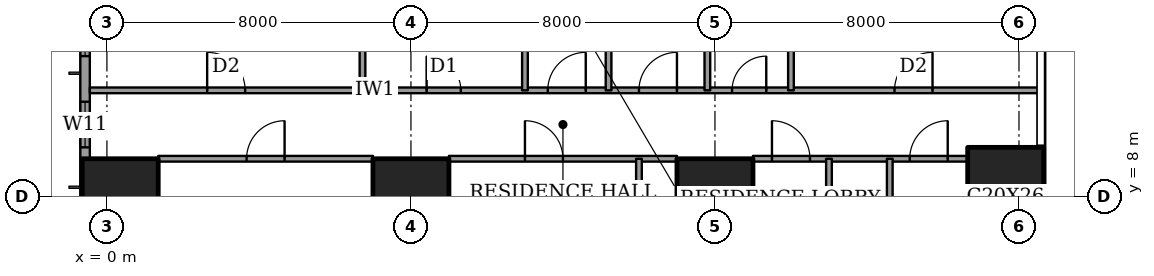
"""IFC4 building model, lengths in metres.
Left out: names, types, materials, properties, quantities, classifications, styles, units other than length and angle.
Written with IfcOpenShell. Run it as: python <this file> out.ifc"""

import sys

from ifc_helpers import new_model, si_unit, direction, frame, frame_2d, origin, origin_2d, place, context, subcontext, project, spatial, rectangle, extrude, element, fill, save


model = new_model("IFC4")
c1 = context("Model", 3, precision=1e-05, world=origin(), true_north=direction((0.0, 1.0)))
c2 = subcontext(c1, "Body", "Model", "MODEL_VIEW")
j1 = project(units=[si_unit("LENGTHUNIT", "METRE"), si_unit("PLANEANGLEUNIT", "RADIAN")], contexts=[c1])
p1 = place(None, origin())
s1 = spatial("IfcSite", under=j1, at=p1, CompositionType="ELEMENT")
p2 = place(p1, origin())
s2 = spatial("IfcBuilding", under=s1, at=p2, CompositionType="ELEMENT")
p3 = place(p2, frame((0.0, 0.0, 99.8)))
s3 = spatial("IfcBuildingStorey", under=s2, at=p3, CompositionType="ELEMENT", Elevation=99.8)
for number, where, z_axis, x_axis in (
    (1, (0.35, 8.0, 0.0), (0.0, 0.0, 1.0), (1.0, 0.0, 0.0)),
    (2, (8.0, 8.0, 0.0), (0.0, 0.0, 1.0), (1.0, 0.0, 0.0)),
    (3, (16.0, 8.0, 0.0), (0.0, 0.0, 1.0), (1.0, 0.0, 0.0)),
):
    element("IfcColumn", number, at=place(p3, frame(where, z_axis=z_axis, x_axis=x_axis)), inside=s3, PredefinedType="COLUMN", context=c2, shape_type="SweptSolid", body=[
        extrude(rectangle(XDim=2.0, YDim=2.0, at=origin_2d()), origin(), (0.0, 0.0, 1.0), 3.6),
    ])
p4 = place(p3, frame((23.65, 8.0, 0.0), z_axis=(0.0, 0.0, 1.0), x_axis=(1.0, 0.0, 0.0)))
e4 = element("IfcColumn", 4, at=p4, inside=s3, PredefinedType="COLUMN", context=c2, shape_type="SweptSolid", body=[
    extrude(rectangle(XDim=2.0, YDim=2.6, at=origin_2d()), origin(), (0.0, 0.0, 1.0), 3.6),
])
p5 = place(p3, frame((-0.575, 44.825, 0.0), z_axis=(0.0, 0.0, 1.0), x_axis=(0.0, -1.0, 0.0)))
e5 = element("IfcWall", 5, at=p5, inside=s3, PredefinedType="SOLIDWALL", context=c2, shape_type="SweptSolid", body=[
    extrude(rectangle(XDim=41.65, YDim=0.25, at=frame_2d((20.825, 0.0))), origin(), (0.0, 0.0, 1.0), 3.6),
])
p6 = place(p5, frame((0.775, 0.0, 0.4)))
e6 = element("IfcOpeningElement", 6, at=p6, cuts=e5, PredefinedType="OPENING", context=c2, shape_type="SweptSolid", body=[
    extrude(rectangle(XDim=2.4, YDim=2.2, at=frame_2d((1.2, 1.1))), frame((0.0, 0.135, 0.0), z_axis=(0.0, -1.0, 0.0), x_axis=(1.0, 0.0, 0.0)), (0.0, 0.0, 1.0), 0.27),
])
p7 = place(p5, frame((6.1, 0.0, 0.4)))
e7 = element("IfcOpeningElement", 7, at=p7, cuts=e5, PredefinedType="OPENING", context=c2, shape_type="SweptSolid", body=[
    extrude(rectangle(XDim=1.2, YDim=2.2, at=frame_2d((0.6, 1.1))), frame((0.0, 0.135, 0.0), z_axis=(0.0, -1.0, 0.0), x_axis=(1.0, 0.0, 0.0)), (0.0, 0.0, 1.0), 0.27),
])
p8 = place(p5, frame((8.425, 0.0, 0.4)))
e8 = element("IfcOpeningElement", 8, at=p8, cuts=e5, PredefinedType="OPENING", context=c2, shape_type="SweptSolid", body=[
    extrude(rectangle(XDim=2.4, YDim=2.2, at=frame_2d((1.2, 1.1))), frame((0.0, 0.135, 0.0), z_axis=(0.0, -1.0, 0.0), x_axis=(1.0, 0.0, 0.0)), (0.0, 0.0, 1.0), 0.27),
])
p9 = place(p5, frame((15.625, 0.0, 0.4)))
e9 = element("IfcOpeningElement", 9, at=p9, cuts=e5, PredefinedType="OPENING", context=c2, shape_type="SweptSolid", body=[
    extrude(rectangle(XDim=2.4, YDim=2.2, at=frame_2d((1.2, 1.1))), frame((0.0, 0.135, 0.0), z_axis=(0.0, -1.0, 0.0), x_axis=(1.0, 0.0, 0.0)), (0.0, 0.0, 1.0), 0.27),
])
p10 = place(p5, frame((23.625, 0.0, 0.4)))
e10 = element("IfcOpeningElement", 10, at=p10, cuts=e5, PredefinedType="OPENING", context=c2, shape_type="SweptSolid", body=[
    extrude(rectangle(XDim=2.4, YDim=2.2, at=frame_2d((1.2, 1.1))), frame((0.0, 0.135, 0.0), z_axis=(0.0, -1.0, 0.0), x_axis=(1.0, 0.0, 0.0)), (0.0, 0.0, 1.0), 0.27),
])
p11 = place(p5, frame((30.725, 0.0, 0.4)))
e11 = element("IfcOpeningElement", 11, at=p11, cuts=e5, PredefinedType="OPENING", context=c2, shape_type="SweptSolid", body=[
    extrude(rectangle(XDim=2.4, YDim=2.2, at=frame_2d((1.2, 1.1))), frame((0.0, 0.135, 0.0), z_axis=(0.0, -1.0, 0.0), x_axis=(1.0, 0.0, 0.0)), (0.0, 0.0, 1.0), 0.27),
])
p12 = place(p5, frame((34.325, 0.0, 0.4)))
e12 = element("IfcOpeningElement", 12, at=p12, cuts=e5, PredefinedType="OPENING", context=c2, shape_type="SweptSolid", body=[
    extrude(rectangle(XDim=1.2, YDim=2.2, at=frame_2d((0.6, 1.1))), frame((0.0, 0.135, 0.0), z_axis=(0.0, -1.0, 0.0), x_axis=(1.0, 0.0, 0.0)), (0.0, 0.0, 1.0), 0.27),
])
p13 = place(p5, frame((38.475, 0.0, 0.4)))
e13 = element("IfcOpeningElement", 13, at=p13, cuts=e5, PredefinedType="OPENING", context=c2, shape_type="SweptSolid", body=[
    extrude(rectangle(XDim=2.4, YDim=2.2, at=frame_2d((1.2, 1.1))), frame((0.0, 0.135, 0.0), z_axis=(0.0, -1.0, 0.0), x_axis=(1.0, 0.0, 0.0)), (0.0, 0.0, 1.0), 0.27),
])
p14 = place(p3, frame((1.35, 9.0, 0.0), z_axis=(0.0, 0.0, 1.0), x_axis=(1.0, 0.0, 0.0)))
e14 = element("IfcWall", 14, at=p14, inside=s3, PredefinedType="PARTITIONING", context=c2, shape_type="SweptSolid", body=[
    extrude(rectangle(XDim=5.65, YDim=0.15, at=frame_2d((2.825, 0.0))), origin(), (0.0, 0.0, 1.0), 3.35),
])
p15 = place(p14, frame((2.325, 0.0, 0.0)))
e15 = element("IfcOpeningElement", 15, at=p15, cuts=e14, PredefinedType="OPENING", context=c2, shape_type="SweptSolid", body=[
    extrude(rectangle(XDim=1.0, YDim=2.1, at=frame_2d((0.5, 1.05))), frame((0.0, 0.085, 0.0), z_axis=(0.0, -1.0, 0.0), x_axis=(1.0, 0.0, 0.0)), (0.0, 0.0, 1.0), 0.17),
])
p16 = place(p3, frame((9.0, 9.0, 0.0), z_axis=(0.0, 0.0, 1.0), x_axis=(1.0, 0.0, 0.0)))
e16 = element("IfcWall", 16, at=p16, inside=s3, PredefinedType="PARTITIONING", context=c2, shape_type="SweptSolid", body=[
    extrude(rectangle(XDim=6.0, YDim=0.15, at=frame_2d((3.0, 0.0))), origin(), (0.0, 0.0, 1.0), 3.35),
])
p17 = place(p16, frame((2.0, 0.0, 0.0)))
e17 = element("IfcOpeningElement", 17, at=p17, cuts=e16, PredefinedType="OPENING", context=c2, shape_type="SweptSolid", body=[
    extrude(rectangle(XDim=1.0, YDim=2.1, at=frame_2d((0.5, 1.05))), frame((0.0, 0.085, 0.0), z_axis=(0.0, -1.0, 0.0), x_axis=(1.0, 0.0, 0.0)), (0.0, 0.0, 1.0), 0.17),
])
p18 = place(p3, frame((17.0, 9.0, 0.0), z_axis=(0.0, 0.0, 1.0), x_axis=(1.0, 0.0, 0.0)))
e18 = element("IfcWall", 18, at=p18, inside=s3, PredefinedType="PARTITIONING", context=c2, shape_type="SweptSolid", body=[
    extrude(rectangle(XDim=5.65, YDim=0.15, at=frame_2d((2.825, 0.0))), origin(), (0.0, 0.0, 1.0), 3.35),
])
p19 = place(p18, frame((0.5, 0.0, 0.0)))
e19 = element("IfcOpeningElement", 19, at=p19, cuts=e18, PredefinedType="OPENING", context=c2, shape_type="SweptSolid", body=[
    extrude(rectangle(XDim=1.0, YDim=2.1, at=frame_2d((0.5, 1.05))), frame((0.0, 0.085, 0.0), z_axis=(0.0, -1.0, 0.0), x_axis=(1.0, 0.0, 0.0)), (0.0, 0.0, 1.0), 0.17),
])
p20 = place(p18, frame((4.125, 0.0, 0.0)))
e20 = element("IfcOpeningElement", 20, at=p20, cuts=e18, PredefinedType="OPENING", context=c2, shape_type="SweptSolid", body=[
    extrude(rectangle(XDim=1.0, YDim=2.1, at=frame_2d((0.5, 1.05))), frame((0.0, 0.085, 0.0), z_axis=(0.0, -1.0, 0.0), x_axis=(1.0, 0.0, 0.0)), (0.0, 0.0, 1.0), 0.17),
])
p21 = place(p3, frame((-0.45, 10.8, 0.0), z_axis=(0.0, 0.0, 1.0), x_axis=(1.0, 0.0, 0.0)))
e21 = element("IfcWall", 21, at=p21, inside=s3, PredefinedType="PARTITIONING", context=c2, shape_type="SweptSolid", body=[
    extrude(rectangle(XDim=25.011, YDim=0.15, at=frame_2d((12.505, 0.0))), origin(), (0.0, 0.0, 1.0), 3.35),
])
p22 = place(p21, frame((12.05, 0.0, 0.0)))
e22 = element("IfcOpeningElement", 22, at=p22, cuts=e21, PredefinedType="OPENING", context=c2, shape_type="SweptSolid", body=[
    extrude(rectangle(XDim=1.0, YDim=2.1, at=frame_2d((0.5, 1.05))), frame((0.0, 0.085, 0.0), z_axis=(0.0, -1.0, 0.0), x_axis=(1.0, 0.0, 0.0)), (0.0, 0.0, 1.0), 0.17),
])
p23 = place(p21, frame((3.087, 0.0, 0.0)))
e23 = element("IfcOpeningElement", 23, at=p23, cuts=e21, PredefinedType="OPENING", context=c2, shape_type="SweptSolid", body=[
    extrude(rectangle(XDim=1.0, YDim=2.1, at=frame_2d((0.5, 1.05))), frame((0.0, 0.085, 0.0), z_axis=(0.0, -1.0, 0.0), x_axis=(1.0, 0.0, 0.0)), (0.0, 0.0, 1.0), 0.17),
])
p24 = place(p21, frame((8.863, 0.0, 0.0)))
e24 = element("IfcOpeningElement", 24, at=p24, cuts=e21, PredefinedType="OPENING", context=c2, shape_type="SweptSolid", body=[
    extrude(rectangle(XDim=0.9, YDim=2.1, at=frame_2d((0.45, 1.05))), frame((0.0, 0.085, 0.0), z_axis=(0.0, -1.0, 0.0), x_axis=(1.0, 0.0, 0.0)), (0.0, 0.0, 1.0), 0.17),
])
p25 = place(p21, frame((14.45, 0.0, 0.0)))
e25 = element("IfcOpeningElement", 25, at=p25, cuts=e21, PredefinedType="OPENING", context=c2, shape_type="SweptSolid", body=[
    extrude(rectangle(XDim=1.0, YDim=2.1, at=frame_2d((0.5, 1.05))), frame((0.0, 0.085, 0.0), z_axis=(0.0, -1.0, 0.0), x_axis=(1.0, 0.0, 0.0)), (0.0, 0.0, 1.0), 0.17),
])
p26 = place(p21, frame((16.9, 0.0, 0.0)))
e26 = element("IfcOpeningElement", 26, at=p26, cuts=e21, PredefinedType="OPENING", context=c2, shape_type="SweptSolid", body=[
    extrude(rectangle(XDim=0.9, YDim=2.1, at=frame_2d((0.45, 1.05))), frame((0.0, 0.085, 0.0), z_axis=(0.0, -1.0, 0.0), x_axis=(1.0, 0.0, 0.0)), (0.0, 0.0, 1.0), 0.17),
])
p27 = place(p21, frame((21.175, 0.0, 0.0)))
e27 = element("IfcOpeningElement", 27, at=p27, cuts=e21, PredefinedType="OPENING", context=c2, shape_type="SweptSolid", body=[
    extrude(rectangle(XDim=1.0, YDim=2.1, at=frame_2d((0.5, 1.05))), frame((0.0, 0.085, 0.0), z_axis=(0.0, -1.0, 0.0), x_axis=(1.0, 0.0, 0.0)), (0.0, 0.0, 1.0), 0.17),
])
p28 = place(p3, frame((6.725, 10.8, 0.0), z_axis=(0.0, 0.0, 1.0), x_axis=(0.0, 1.0, 0.0)))
e28 = element("IfcWall", 28, at=p28, inside=s3, PredefinedType="PARTITIONING", context=c2, shape_type="SweptSolid", body=[
    extrude(rectangle(XDim=4.0, YDim=0.15, at=frame_2d((2.0, 0.0))), origin(), (0.0, 0.0, 1.0), 3.35),
])
p29 = place(p3, frame((11.0, 10.8, 0.0), z_axis=(0.0, 0.0, 1.0), x_axis=(0.0, 1.0, 0.0)))
e29 = element("IfcWall", 29, at=p29, inside=s3, PredefinedType="PARTITIONING", context=c2, shape_type="SweptSolid", body=[
    extrude(rectangle(XDim=10.8, YDim=0.15, at=frame_2d((5.4, 0.0))), origin(), (0.0, 0.0, 1.0), 3.35),
])
p30 = place(p29, frame((8.0, 0.0, 0.0)))
e30 = element("IfcOpeningElement", 30, at=p30, cuts=e29, PredefinedType="OPENING", context=c2, shape_type="SweptSolid", body=[
    extrude(rectangle(XDim=1.0, YDim=2.1, at=frame_2d((0.5, 1.05))), frame((0.0, 0.085, 0.0), z_axis=(0.0, -1.0, 0.0), x_axis=(1.0, 0.0, 0.0)), (0.0, 0.0, 1.0), 0.17),
])
p31 = place(p3, frame((13.2, 10.8, 0.0), z_axis=(0.0, 0.0, 1.0), x_axis=(0.0, 1.0, 0.0)))
e31 = element("IfcWall", 31, at=p31, inside=s3, PredefinedType="PARTITIONING", context=c2, shape_type="SweptSolid", body=[
    extrude(rectangle(XDim=6.2, YDim=0.15, at=frame_2d((3.1, 0.0))), origin(), (0.0, 0.0, 1.0), 3.35),
])
p32 = place(p3, frame((14.0, -0.45, 0.0), z_axis=(0.0, 0.0, 1.0), x_axis=(0.0, 1.0, 0.0)))
e32 = element("IfcWall", 32, at=p32, inside=s3, PredefinedType="PARTITIONING", context=c2, shape_type="SweptSolid", body=[
    extrude(rectangle(XDim=9.45, YDim=0.15, at=frame_2d((4.725, 0.0))), origin(), (0.0, 0.0, 1.0), 3.35),
])
p33 = place(p3, frame((15.8, 10.8, 0.0), z_axis=(0.0, 0.0, 1.0), x_axis=(0.0, 1.0, 0.0)))
e33 = element("IfcWall", 33, at=p33, inside=s3, PredefinedType="PARTITIONING", context=c2, shape_type="SweptSolid", body=[
    extrude(rectangle(XDim=4.0, YDim=0.15, at=frame_2d((2.0, 0.0))), origin(), (0.0, 0.0, 1.0), 3.35),
])
p34 = place(p3, frame((18.0, 10.8, 0.0), z_axis=(0.0, 0.0, 1.0), x_axis=(0.0, 1.0, 0.0)))
e34 = element("IfcWall", 34, at=p34, inside=s3, PredefinedType="PARTITIONING", context=c2, shape_type="SweptSolid", body=[
    extrude(rectangle(XDim=6.2, YDim=0.15, at=frame_2d((3.1, 0.0))), origin(), (0.0, 0.0, 1.0), 3.35),
])
p35 = place(p3, frame((19.0, -0.45, 0.0), z_axis=(0.0, 0.0, 1.0), x_axis=(0.0, 1.0, 0.0)))
e35 = element("IfcWall", 35, at=p35, inside=s3, PredefinedType="PARTITIONING", context=c2, shape_type="SweptSolid", body=[
    extrude(rectangle(XDim=9.45, YDim=0.15, at=frame_2d((4.725, 0.0))), origin(), (0.0, 0.0, 1.0), 3.35),
])
p36 = place(p3, frame((20.6, -0.45, 0.0), z_axis=(0.0, 0.0, 1.0), x_axis=(0.0, 1.0, 0.0)))
e36 = element("IfcWall", 36, at=p36, inside=s3, PredefinedType="PARTITIONING", context=c2, shape_type="SweptSolid", body=[
    extrude(rectangle(XDim=9.45, YDim=0.15, at=frame_2d((4.725, 0.0))), origin(), (0.0, 0.0, 1.0), 3.35),
])
p37 = place(p36, frame((4.275, 0.0, 0.0)))
e37 = element("IfcOpeningElement", 37, at=p37, cuts=e36, PredefinedType="OPENING", context=c2, shape_type="SweptSolid", body=[
    extrude(rectangle(XDim=0.9, YDim=2.1, at=frame_2d((0.45, 1.05))), frame((0.0, 0.085, 0.0), z_axis=(0.0, -1.0, 0.0), x_axis=(1.0, 0.0, 0.0)), (0.0, 0.0, 1.0), 0.17),
])
p38 = place(p11, origin())
e38 = element("IfcWindow", 38, at=p38, inside=s3, PartitioningType="SINGLE_PANEL", PredefinedType="WINDOW", context=c2, shape_type="SweptSolid", body=[
    extrude(rectangle(XDim=2.4, YDim=2.2, at=frame_2d((1.2, 1.1))), frame((0.0, 0.03, 0.0), z_axis=(0.0, -1.0, 0.0), x_axis=(1.0, 0.0, 0.0)), (0.0, 0.0, 1.0), 0.06),
])
fill(e11, e38)
p39 = place(p12, origin())
e39 = element("IfcWindow", 39, at=p39, inside=s3, PartitioningType="SINGLE_PANEL", PredefinedType="WINDOW", context=c2, shape_type="SweptSolid", body=[
    extrude(rectangle(XDim=1.2, YDim=2.2, at=frame_2d((0.6, 1.1))), frame((0.0, 0.03, 0.0), z_axis=(0.0, -1.0, 0.0), x_axis=(1.0, 0.0, 0.0)), (0.0, 0.0, 1.0), 0.06),
])
fill(e12, e39)
p40 = place(p15, origin())
e40 = element("IfcDoor", 40, at=p40, inside=s3, OperationType="SINGLE_SWING_LEFT", PredefinedType="DOOR", context=c2, shape_type="SweptSolid", body=[
    extrude(rectangle(XDim=1.0, YDim=2.1, at=frame_2d((0.5, 1.05))), frame((0.0, 0.025, 0.0), z_axis=(0.0, -1.0, 0.0), x_axis=(1.0, 0.0, 0.0)), (0.0, 0.0, 1.0), 0.05),
])
fill(e15, e40)
p41 = place(p17, origin())
e41 = element("IfcDoor", 41, at=p41, inside=s3, OperationType="SINGLE_SWING_RIGHT", PredefinedType="DOOR", context=c2, shape_type="SweptSolid", body=[
    extrude(rectangle(XDim=1.0, YDim=2.1, at=frame_2d((0.5, 1.05))), frame((0.0, 0.025, 0.0), z_axis=(0.0, -1.0, 0.0), x_axis=(1.0, 0.0, 0.0)), (0.0, 0.0, 1.0), 0.05),
])
fill(e17, e41)
p42 = place(p19, origin())
e42 = element("IfcDoor", 42, at=p42, inside=s3, OperationType="SINGLE_SWING_RIGHT", PredefinedType="DOOR", context=c2, shape_type="SweptSolid", body=[
    extrude(rectangle(XDim=1.0, YDim=2.1, at=frame_2d((0.5, 1.05))), frame((0.0, 0.025, 0.0), z_axis=(0.0, -1.0, 0.0), x_axis=(1.0, 0.0, 0.0)), (0.0, 0.0, 1.0), 0.05),
])
fill(e19, e42)
p43 = place(p20, origin())
e43 = element("IfcDoor", 43, at=p43, inside=s3, OperationType="SINGLE_SWING_LEFT", PredefinedType="DOOR", context=c2, shape_type="SweptSolid", body=[
    extrude(rectangle(XDim=1.0, YDim=2.1, at=frame_2d((0.5, 1.05))), frame((0.0, 0.025, 0.0), z_axis=(0.0, -1.0, 0.0), x_axis=(1.0, 0.0, 0.0)), (0.0, 0.0, 1.0), 0.05),
])
fill(e20, e43)
p44 = place(p22, origin())
e44 = element("IfcDoor", 44, at=p44, inside=s3, OperationType="SINGLE_SWING_LEFT", PredefinedType="DOOR", context=c2, shape_type="SweptSolid", body=[
    extrude(rectangle(XDim=1.0, YDim=2.1, at=frame_2d((0.5, 1.05))), frame((0.0, 0.025, 0.0), z_axis=(0.0, -1.0, 0.0), x_axis=(1.0, 0.0, 0.0)), (0.0, 0.0, 1.0), 0.05),
])
fill(e22, e44)
p45 = place(p23, origin())
e45 = element("IfcDoor", 45, at=p45, inside=s3, OperationType="SINGLE_SWING_RIGHT", PredefinedType="DOOR", context=c2, shape_type="SweptSolid", body=[
    extrude(rectangle(XDim=1.0, YDim=2.1, at=frame_2d((0.5, 1.05))), frame((0.0, 0.025, 0.0), z_axis=(0.0, -1.0, 0.0), x_axis=(1.0, 0.0, 0.0)), (0.0, 0.0, 1.0), 0.05),
])
fill(e23, e45)
p46 = place(p24, origin())
e46 = element("IfcDoor", 46, at=p46, inside=s3, OperationType="SINGLE_SWING_RIGHT", PredefinedType="DOOR", context=c2, shape_type="SweptSolid", body=[
    extrude(rectangle(XDim=0.9, YDim=2.1, at=frame_2d((0.45, 1.05))), frame((0.0, 0.025, 0.0), z_axis=(0.0, -1.0, 0.0), x_axis=(1.0, 0.0, 0.0)), (0.0, 0.0, 1.0), 0.05),
])
fill(e24, e46)
p47 = place(p25, origin())
e47 = element("IfcDoor", 47, at=p47, inside=s3, OperationType="SINGLE_SWING_LEFT", PredefinedType="DOOR", context=c2, shape_type="SweptSolid", body=[
    extrude(rectangle(XDim=1.0, YDim=2.1, at=frame_2d((0.5, 1.05))), frame((0.0, 0.025, 0.0), z_axis=(0.0, -1.0, 0.0), x_axis=(1.0, 0.0, 0.0)), (0.0, 0.0, 1.0), 0.05),
])
fill(e25, e47)
p48 = place(p26, origin())
e48 = element("IfcDoor", 48, at=p48, inside=s3, OperationType="SINGLE_SWING_LEFT", PredefinedType="DOOR", context=c2, shape_type="SweptSolid", body=[
    extrude(rectangle(XDim=0.9, YDim=2.1, at=frame_2d((0.45, 1.05))), frame((0.0, 0.025, 0.0), z_axis=(0.0, -1.0, 0.0), x_axis=(1.0, 0.0, 0.0)), (0.0, 0.0, 1.0), 0.05),
])
fill(e26, e48)
p49 = place(p27, origin())
e49 = element("IfcDoor", 49, at=p49, inside=s3, OperationType="SINGLE_SWING_LEFT", PredefinedType="DOOR", context=c2, shape_type="SweptSolid", body=[
    extrude(rectangle(XDim=1.0, YDim=2.1, at=frame_2d((0.5, 1.05))), frame((0.0, 0.025, 0.0), z_axis=(0.0, -1.0, 0.0), x_axis=(1.0, 0.0, 0.0)), (0.0, 0.0, 1.0), 0.05),
])
fill(e27, e49)
save(model, sys.argv[1])
